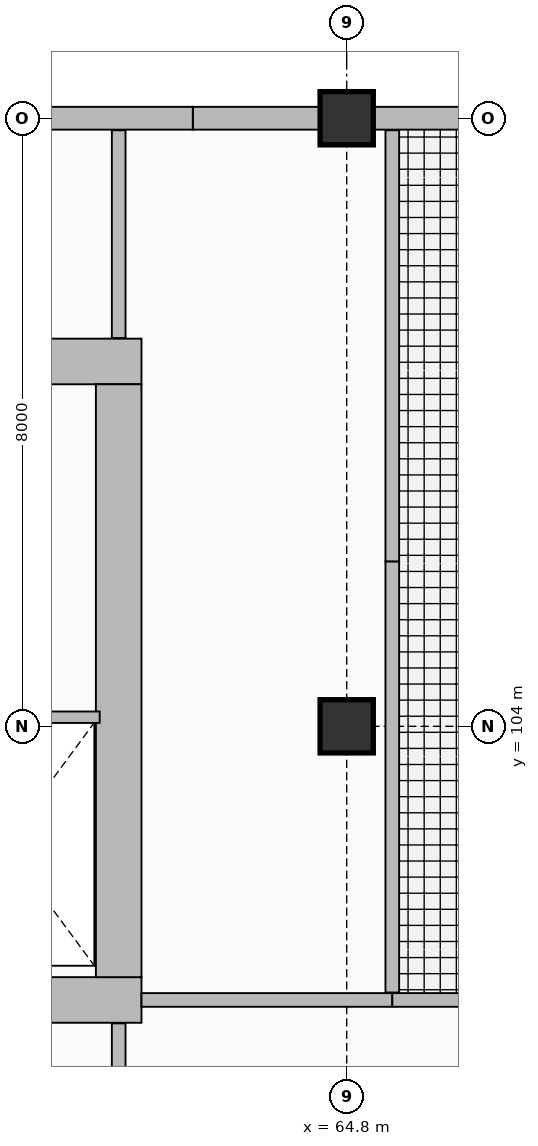
"""IFC4 building model, lengths in metres.
Left out: names, types, materials, properties, quantities, classifications, styles, units other than length and angle.
Written with IfcOpenShell. Run it as: python <this file> out.ifc"""

import sys

from ifc_helpers import new_model, si_unit, direction, frame, frame_2d, origin, origin_2d, place, context, subcontext, project, spatial, rectangle, extrude, element, fill, save


model = new_model("IFC4")
c1 = context("Model", 3, precision=1e-05, world=origin(), true_north=direction((0.0, 1.0)))
c2 = subcontext(c1, "Body", "Model", "MODEL_VIEW")
j1 = project(units=[si_unit("LENGTHUNIT", "METRE"), si_unit("PLANEANGLEUNIT", "RADIAN")], contexts=[c1])
p1 = place(None, origin())
s1 = spatial("IfcSite", under=j1, at=p1, CompositionType="ELEMENT")
p2 = place(p1, origin())
s2 = spatial("IfcBuilding", under=s1, at=p2, CompositionType="ELEMENT")
p3 = place(p2, frame((0.0, 0.0, 5.4)))
s3 = spatial("IfcBuildingStorey", under=s2, at=p3, CompositionType="ELEMENT", Elevation=5.4)
p4 = place(p3, frame((46.7, 100.4, 0.0), z_axis=(0.0, 0.0, 1.0), x_axis=(1.0, 0.0, 0.0)))
e1 = element("IfcWall", 1, at=p4, inside=s3, PredefinedType="SHEAR", context=c2, shape_type="SweptSolid", body=[
    extrude(rectangle(XDim=15.4, YDim=0.6, at=frame_2d((7.7, 0.0))), origin(), (0.0, 0.0, 1.0), 4.8),
])
p5 = place(p4, frame((1.05, 0.0, 0.0)))
e2 = element("IfcOpeningElement", 2, at=p5, cuts=e1, PredefinedType="OPENING", context=c2, shape_type="SweptSolid", body=[
    extrude(rectangle(XDim=1.15, YDim=2.25, at=frame_2d((0.575, 1.125))), frame((0.0, 0.31, 0.0), z_axis=(0.0, -1.0, 0.0), x_axis=(1.0, 0.0, 0.0)), (0.0, 0.0, 1.0), 0.62),
])
p6 = place(p4, frame((10.333, 0.0, 0.0)))
e3 = element("IfcOpeningElement", 3, at=p6, cuts=e1, PredefinedType="OPENING", context=c2, shape_type="SweptSolid", body=[
    extrude(rectangle(XDim=1.1, YDim=2.2, at=frame_2d((0.55, 1.1))), frame((0.0, 0.31, 0.0), z_axis=(0.0, -1.0, 0.0), x_axis=(1.0, 0.0, 0.0)), (0.0, 0.0, 1.0), 0.62),
])
p7 = place(p4, frame((13.048, 0.0, 0.0)))
e4 = element("IfcOpeningElement", 4, at=p7, cuts=e1, PredefinedType="OPENING", context=c2, shape_type="SweptSolid", body=[
    extrude(rectangle(XDim=1.1, YDim=2.2, at=frame_2d((0.55, 1.1))), frame((0.0, 0.31, 0.0), z_axis=(0.0, -1.0, 0.0), x_axis=(1.0, 0.0, 0.0)), (0.0, 0.0, 1.0), 0.62),
])
p8 = place(p3, frame((46.7, 108.8, 0.0), z_axis=(0.0, 0.0, 1.0), x_axis=(1.0, 0.0, 0.0)))
e5 = element("IfcWall", 5, at=p8, inside=s3, PredefinedType="SHEAR", context=c2, shape_type="SweptSolid", body=[
    extrude(rectangle(XDim=15.4, YDim=0.6, at=frame_2d((7.7, 0.0))), origin(), (0.0, 0.0, 1.0), 4.8),
])
p9 = place(p3, frame((61.8, 100.7, 0.0), z_axis=(0.0, 0.0, 1.0), x_axis=(0.0, 1.0, 0.0)))
e6 = element("IfcWall", 6, at=p9, inside=s3, PredefinedType="SHEAR", context=c2, shape_type="SweptSolid", body=[
    extrude(rectangle(XDim=7.8, YDim=0.6, at=frame_2d((3.9, 0.0))), origin(), (0.0, 0.0, 1.0), 4.8),
])
for number, where, z_axis, x_axis in (
    (7, (64.8, 104.0, 0.0), (0.0, 0.0, 1.0), (1.0, 0.0, 0.0)),
    (8, (64.8, 112.0, 0.0), (0.0, 0.0, 1.0), (1.0, 0.0, 0.0)),
):
    element("IfcColumn", number, at=place(p3, frame(where, z_axis=z_axis, x_axis=x_axis)), inside=s3, PredefinedType="COLUMN", context=c2, shape_type="SweptSolid", body=[
        extrude(rectangle(XDim=0.7, YDim=0.7, at=origin_2d()), origin(), (0.0, 0.0, 1.0), 4.8),
    ])
p10 = place(p3, frame((76.95, 112.0, 0.0), z_axis=(0.0, 0.0, 1.0), x_axis=(-1.0, 0.0, 0.0)))
e9 = element("IfcWall", 9, at=p10, inside=s3, PredefinedType="SOLIDWALL", context=c2, shape_type="SweptSolid", body=[
    extrude(rectangle(XDim=14.175, YDim=0.3, at=frame_2d((7.087, 0.0))), origin(), (0.0, 0.0, 1.0), 3.812),
])
p11 = place(p10, frame((5.4, 0.0, 0.95)))
e10 = element("IfcOpeningElement", 10, at=p11, cuts=e9, PredefinedType="OPENING", context=c2, shape_type="SweptSolid", body=[
    extrude(rectangle(XDim=3.6, YDim=0.9, at=frame_2d((1.8, 0.45))), frame((0.0, 0.16, 0.0), z_axis=(0.0, -1.0, 0.0), x_axis=(1.0, 0.0, 0.0)), (0.0, 0.0, 1.0), 0.32),
])
p12 = place(p3, frame((62.775, 112.0, 0.0), z_axis=(0.0, 0.0, 1.0), x_axis=(-1.0, 0.0, 0.0)))
e11 = element("IfcWall", 11, at=p12, inside=s3, PredefinedType="SOLIDWALL", context=c2, shape_type="SweptSolid", body=[
    extrude(rectangle(XDim=14.175, YDim=0.3, at=frame_2d((7.087, 0.0))), origin(), (0.0, 0.0, 1.0), 3.812),
])
p13 = place(p12, frame((8.55, 0.0, 0.95)))
e12 = element("IfcOpeningElement", 12, at=p13, cuts=e11, PredefinedType="OPENING", context=c2, shape_type="SweptSolid", body=[
    extrude(rectangle(XDim=1.6, YDim=1.4, at=frame_2d((0.8, 0.7))), frame((0.0, 0.16, 0.0), z_axis=(0.0, -1.0, 0.0), x_axis=(1.0, 0.0, 0.0)), (0.0, 0.0, 1.0), 0.32),
])
p14 = place(p3, frame((56.3, 104.12, 0.0), z_axis=(0.0, 0.0, 1.0), x_axis=(1.0, 0.0, 0.0)))
e13 = element("IfcWall", 13, at=p14, inside=s3, PredefinedType="PARTITIONING", context=c2, shape_type="SweptSolid", body=[
    extrude(rectangle(XDim=5.25, YDim=0.15, at=frame_2d((2.625, 0.0))), origin(), (0.0, 0.0, 1.0), 4.52),
])
p15 = place(p3, frame((62.1, 100.4, 0.0), z_axis=(0.0, 0.0, 1.0), x_axis=(1.0, 0.0, 0.0)))
e14 = element("IfcWall", 14, at=p15, inside=s3, PredefinedType="PARTITIONING", context=c2, shape_type="SweptSolid", body=[
    extrude(rectangle(XDim=3.3, YDim=0.18, at=frame_2d((1.65, 0.0))), origin(), (0.0, 0.0, 1.0), 4.52),
])
p16 = place(p15, frame((1.05, 0.0, 0.0)))
e15 = element("IfcOpeningElement", 15, at=p16, cuts=e14, PredefinedType="OPENING", context=c2, shape_type="SweptSolid", body=[
    extrude(rectangle(XDim=1.2, YDim=2.2, at=frame_2d((0.6, 1.1))), frame((0.0, 0.1, 0.0), z_axis=(0.0, -1.0, 0.0), x_axis=(1.0, 0.0, 0.0)), (0.0, 0.0, 1.0), 0.2),
])
p17 = place(p3, frame((65.4, 100.4, 0.0), z_axis=(0.0, 0.0, 1.0), x_axis=(1.0, 0.0, 0.0)))
e16 = element("IfcWall", 16, at=p17, inside=s3, PredefinedType="PARTITIONING", context=c2, shape_type="SweptSolid", body=[
    extrude(rectangle(XDim=19.1, YDim=0.18, at=frame_2d((9.55, 0.0))), origin(), (0.0, 0.0, 1.0), 4.52),
])
p18 = place(p17, frame((9.0, 0.0, 0.0)))
e17 = element("IfcOpeningElement", 17, at=p18, cuts=e16, PredefinedType="OPENING", context=c2, shape_type="SweptSolid", body=[
    extrude(rectangle(XDim=1.1, YDim=2.3, at=frame_2d((0.55, 1.15))), frame((0.0, 0.1, 0.0), z_axis=(0.0, -1.0, 0.0), x_axis=(1.0, 0.0, 0.0)), (0.0, 0.0, 1.0), 0.2),
])
p19 = place(p3, frame((61.8, 96.065, 0.0), z_axis=(0.0, 0.0, 1.0), x_axis=(0.0, 1.0, 0.0)))
e18 = element("IfcWall", 18, at=p19, inside=s3, PredefinedType="PARTITIONING", context=c2, shape_type="SweptSolid", body=[
    extrude(rectangle(XDim=4.027, YDim=0.18, at=frame_2d((2.014, 0.0))), origin(), (0.0, 0.0, 1.0), 4.52),
])
p20 = place(p19, frame((1.463, 0.0, 0.0)))
e19 = element("IfcOpeningElement", 19, at=p20, cuts=e18, PredefinedType="OPENING", context=c2, shape_type="SweptSolid", body=[
    extrude(rectangle(XDim=1.1, YDim=2.2, at=frame_2d((0.55, 1.1))), frame((0.0, 0.1, 0.0), z_axis=(0.0, -1.0, 0.0), x_axis=(1.0, 0.0, 0.0)), (0.0, 0.0, 1.0), 0.2),
])
p21 = place(p3, frame((61.8, 109.108, 0.0), z_axis=(0.0, 0.0, 1.0), x_axis=(0.0, 1.0, 0.0)))
e20 = element("IfcWall", 20, at=p21, inside=s3, PredefinedType="PARTITIONING", context=c2, shape_type="SweptSolid", body=[
    extrude(rectangle(XDim=2.734, YDim=0.18, at=frame_2d((1.367, 0.0))), origin(), (0.0, 0.0, 1.0), 4.52),
])
p22 = place(p21, frame((0.817, 0.0, 0.0)))
e21 = element("IfcOpeningElement", 21, at=p22, cuts=e20, PredefinedType="OPENING", context=c2, shape_type="SweptSolid", body=[
    extrude(rectangle(XDim=1.1, YDim=2.2, at=frame_2d((0.55, 1.1))), frame((0.0, 0.1, 0.0), z_axis=(0.0, -1.0, 0.0), x_axis=(1.0, 0.0, 0.0)), (0.0, 0.0, 1.0), 0.2),
])
p23 = place(p3, frame((65.4, 100.498, 0.0), z_axis=(0.0, 0.0, 1.0), x_axis=(0.0, 1.0, 0.0)))
e22 = element("IfcWall", 22, at=p23, inside=s3, PredefinedType="PARTITIONING", context=c2, shape_type="SweptSolid", body=[
    extrude(rectangle(XDim=5.672, YDim=0.18, at=frame_2d((2.836, 0.0))), origin(), (0.0, 0.0, 1.0), 4.52),
])
p24 = place(p3, frame((65.4, 106.17, 0.0), z_axis=(0.0, 0.0, 1.0), x_axis=(0.0, 1.0, 0.0)))
e23 = element("IfcWall", 23, at=p24, inside=s3, PredefinedType="PARTITIONING", context=c2, shape_type="SweptSolid", body=[
    extrude(rectangle(XDim=5.672, YDim=0.18, at=frame_2d((2.836, 0.0))), origin(), (0.0, 0.0, 1.0), 4.52),
])
p25 = place(p16, frame((1.2, 0.0, 0.0), z_axis=(0.0, 0.0, 1.0), x_axis=(-1.0, 0.0, 0.0)))
e24 = element("IfcDoor", 24, at=p25, inside=s3, OperationType="SINGLE_SWING_RIGHT", PredefinedType="DOOR", context=c2, shape_type="SweptSolid", body=[
    extrude(rectangle(XDim=1.2, YDim=2.2, at=frame_2d((0.6, 1.1))), frame((0.0, 0.025, 0.0), z_axis=(0.0, -1.0, 0.0), x_axis=(1.0, 0.0, 0.0)), (0.0, 0.0, 1.0), 0.05),
])
fill(e15, e24)
p26 = place(p22, origin())
e25 = element("IfcDoor", 25, at=p26, inside=s3, OperationType="SINGLE_SWING_LEFT", PredefinedType="DOOR", context=c2, shape_type="SweptSolid", body=[
    extrude(rectangle(XDim=1.1, YDim=2.2, at=frame_2d((0.55, 1.1))), frame((0.0, 0.025, 0.0), z_axis=(0.0, -1.0, 0.0), x_axis=(1.0, 0.0, 0.0)), (0.0, 0.0, 1.0), 0.05),
])
fill(e21, e25)
save(model, sys.argv[1])
